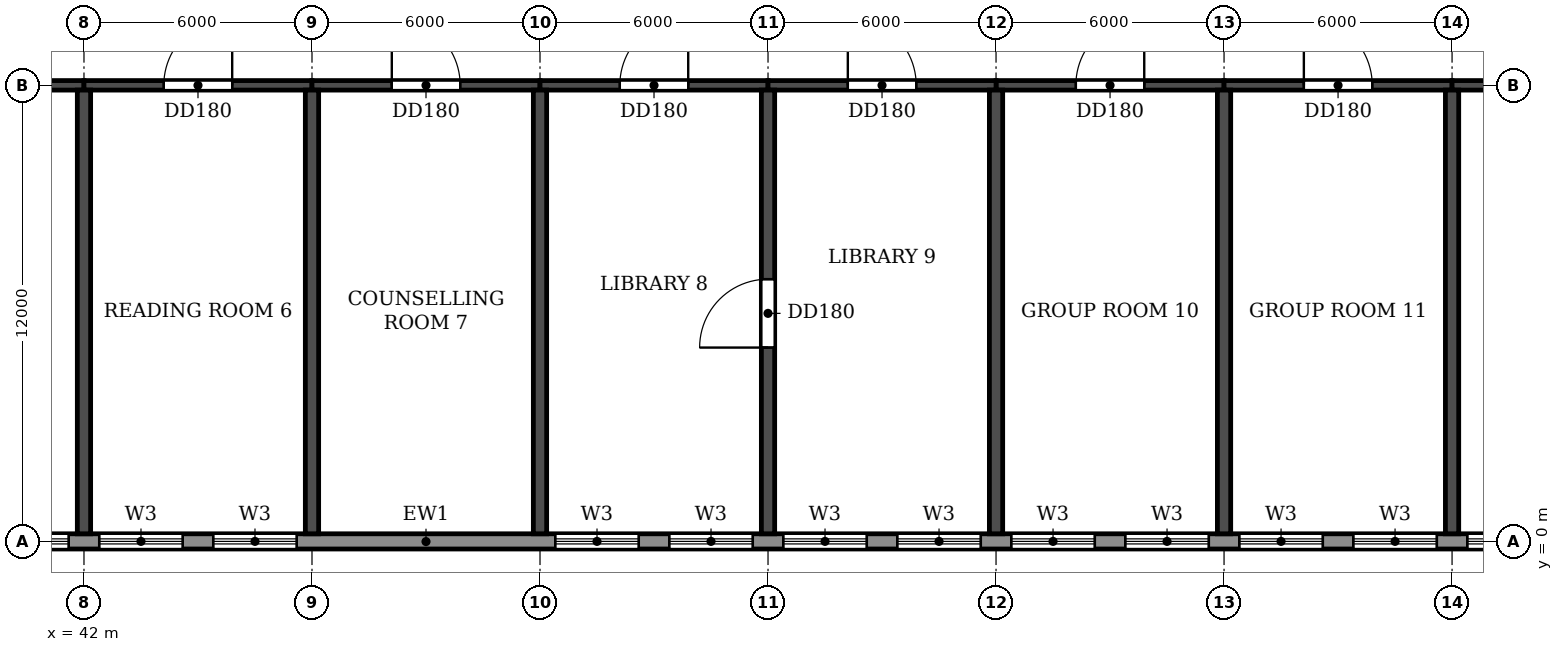
"""IFC4 building model, lengths in metres.
Left out: names, types, materials, properties, quantities, classifications, styles, units other than length and angle.
Written with IfcOpenShell. Run it as: python <this file> out.ifc"""

import sys

from ifc_helpers import new_model, si_unit, direction, frame, frame_2d, origin, place, context, subcontext, project, spatial, rectangle, extrude, element, fill, save


model = new_model("IFC4")
c1 = context("Model", 3, precision=1e-05, world=origin(), true_north=direction((0.0, 1.0)))
c2 = subcontext(c1, "Body", "Model", "MODEL_VIEW")
j1 = project(units=[si_unit("LENGTHUNIT", "METRE"), si_unit("PLANEANGLEUNIT", "RADIAN")], contexts=[c1])
p1 = place(None, origin())
s1 = spatial("IfcSite", under=j1, at=p1, CompositionType="ELEMENT")
p2 = place(p1, origin())
s2 = spatial("IfcBuilding", under=s1, at=p2, CompositionType="ELEMENT")
p3 = place(p2, frame((0.0, 0.0, 105.9)))
s3 = spatial("IfcBuildingStorey", under=s2, at=p3, CompositionType="ELEMENT", Elevation=105.9)
for number, where, z_axis, x_axis in (
    (1, (42.0, 0.2, 0.0), (0.0, 0.0, 1.0), (0.0, 1.0, 0.0)),
    (2, (48.0, 0.2, 0.0), (0.0, 0.0, 1.0), (0.0, 1.0, 0.0)),
    (3, (54.0, 0.2, 0.0), (0.0, 0.0, 1.0), (0.0, 1.0, 0.0)),
):
    element("IfcWall", number, at=place(p3, frame(where, z_axis=z_axis, x_axis=x_axis)), inside=s3, PredefinedType="SHEAR", context=c2, shape_type="SweptSolid", body=[
        extrude(rectangle(XDim=11.675, YDim=0.35, at=frame_2d((5.837, 0.0))), origin(), (0.0, 0.0, 1.0), 3.06),
    ])
p4 = place(p3, frame((60.0, 0.2, 0.0), z_axis=(0.0, 0.0, 1.0), x_axis=(0.0, 1.0, 0.0)))
e4 = element("IfcWall", 4, at=p4, inside=s3, PredefinedType="SHEAR", context=c2, shape_type="SweptSolid", body=[
    extrude(rectangle(XDim=11.675, YDim=0.35, at=frame_2d((5.837, 0.0))), origin(), (0.0, 0.0, 1.0), 3.06),
])
p5 = place(p4, frame((4.9, 0.0, 0.0)))
e5 = element("IfcOpeningElement", 5, at=p5, cuts=e4, PredefinedType="OPENING", context=c2, shape_type="SweptSolid", body=[
    extrude(rectangle(XDim=1.8, YDim=2.1, at=frame_2d((0.9, 1.05))), frame((0.0, 0.185, 0.0), z_axis=(0.0, -1.0, 0.0), x_axis=(1.0, 0.0, 0.0)), (0.0, 0.0, 1.0), 0.37),
])
for number, where, z_axis, x_axis in (
    (6, (66.0, 0.2, 0.0), (0.0, 0.0, 1.0), (0.0, 1.0, 0.0)),
    (7, (72.0, 0.2, 0.0), (0.0, 0.0, 1.0), (0.0, 1.0, 0.0)),
    (8, (78.0, 0.2, 0.0), (0.0, 0.0, 1.0), (0.0, 1.0, 0.0)),
):
    element("IfcWall", number, at=place(p3, frame(where, z_axis=z_axis, x_axis=x_axis)), inside=s3, PredefinedType="SHEAR", context=c2, shape_type="SweptSolid", body=[
        extrude(rectangle(XDim=11.675, YDim=0.35, at=frame_2d((5.837, 0.0))), origin(), (0.0, 0.0, 1.0), 3.06),
    ])
p6 = place(p3, frame((36.0, 12.0, 0.0), z_axis=(0.0, 0.0, 1.0), x_axis=(1.0, 0.0, 0.0)))
e9 = element("IfcWall", 9, at=p6, inside=s3, PredefinedType="SHEAR", context=c2, shape_type="SweptSolid", body=[
    extrude(rectangle(XDim=6.0, YDim=0.25, at=frame_2d((3.0, 0.0))), origin(), (0.0, 0.0, 1.0), 2.46),
])
p7 = place(p6, frame((2.1, 0.0, 0.0)))
e10 = element("IfcOpeningElement", 10, at=p7, cuts=e9, PredefinedType="OPENING", context=c2, shape_type="SweptSolid", body=[
    extrude(rectangle(XDim=1.8, YDim=2.1, at=frame_2d((0.9, 1.05))), frame((0.0, 0.135, 0.0), z_axis=(0.0, -1.0, 0.0), x_axis=(1.0, 0.0, 0.0)), (0.0, 0.0, 1.0), 0.27),
])
p8 = place(p3, frame((42.0, 12.0, 0.0), z_axis=(0.0, 0.0, 1.0), x_axis=(1.0, 0.0, 0.0)))
e11 = element("IfcWall", 11, at=p8, inside=s3, PredefinedType="SHEAR", context=c2, shape_type="SweptSolid", body=[
    extrude(rectangle(XDim=6.0, YDim=0.25, at=frame_2d((3.0, 0.0))), origin(), (0.0, 0.0, 1.0), 2.46),
])
p9 = place(p8, frame((2.1, 0.0, 0.0)))
e12 = element("IfcOpeningElement", 12, at=p9, cuts=e11, PredefinedType="OPENING", context=c2, shape_type="SweptSolid", body=[
    extrude(rectangle(XDim=1.8, YDim=2.1, at=frame_2d((0.9, 1.05))), frame((0.0, 0.135, 0.0), z_axis=(0.0, -1.0, 0.0), x_axis=(1.0, 0.0, 0.0)), (0.0, 0.0, 1.0), 0.27),
])
p10 = place(p3, frame((48.0, 12.0, 0.0), z_axis=(0.0, 0.0, 1.0), x_axis=(1.0, 0.0, 0.0)))
e13 = element("IfcWall", 13, at=p10, inside=s3, PredefinedType="SHEAR", context=c2, shape_type="SweptSolid", body=[
    extrude(rectangle(XDim=6.0, YDim=0.25, at=frame_2d((3.0, 0.0))), origin(), (0.0, 0.0, 1.0), 2.46),
])
p11 = place(p10, frame((2.1, 0.0, 0.0)))
e14 = element("IfcOpeningElement", 14, at=p11, cuts=e13, PredefinedType="OPENING", context=c2, shape_type="SweptSolid", body=[
    extrude(rectangle(XDim=1.8, YDim=2.1, at=frame_2d((0.9, 1.05))), frame((0.0, 0.135, 0.0), z_axis=(0.0, -1.0, 0.0), x_axis=(1.0, 0.0, 0.0)), (0.0, 0.0, 1.0), 0.27),
])
p12 = place(p3, frame((54.0, 12.0, 0.0), z_axis=(0.0, 0.0, 1.0), x_axis=(1.0, 0.0, 0.0)))
e15 = element("IfcWall", 15, at=p12, inside=s3, PredefinedType="SHEAR", context=c2, shape_type="SweptSolid", body=[
    extrude(rectangle(XDim=6.0, YDim=0.25, at=frame_2d((3.0, 0.0))), origin(), (0.0, 0.0, 1.0), 2.46),
])
p13 = place(p12, frame((2.1, 0.0, 0.0)))
e16 = element("IfcOpeningElement", 16, at=p13, cuts=e15, PredefinedType="OPENING", context=c2, shape_type="SweptSolid", body=[
    extrude(rectangle(XDim=1.8, YDim=2.1, at=frame_2d((0.9, 1.05))), frame((0.0, 0.135, 0.0), z_axis=(0.0, -1.0, 0.0), x_axis=(1.0, 0.0, 0.0)), (0.0, 0.0, 1.0), 0.27),
])
p14 = place(p3, frame((60.0, 12.0, 0.0), z_axis=(0.0, 0.0, 1.0), x_axis=(1.0, 0.0, 0.0)))
e17 = element("IfcWall", 17, at=p14, inside=s3, PredefinedType="SHEAR", context=c2, shape_type="SweptSolid", body=[
    extrude(rectangle(XDim=6.0, YDim=0.25, at=frame_2d((3.0, 0.0))), origin(), (0.0, 0.0, 1.0), 2.46),
])
p15 = place(p14, frame((2.1, 0.0, 0.0)))
e18 = element("IfcOpeningElement", 18, at=p15, cuts=e17, PredefinedType="OPENING", context=c2, shape_type="SweptSolid", body=[
    extrude(rectangle(XDim=1.8, YDim=2.1, at=frame_2d((0.9, 1.05))), frame((0.0, 0.135, 0.0), z_axis=(0.0, -1.0, 0.0), x_axis=(1.0, 0.0, 0.0)), (0.0, 0.0, 1.0), 0.27),
])
p16 = place(p3, frame((66.0, 12.0, 0.0), z_axis=(0.0, 0.0, 1.0), x_axis=(1.0, 0.0, 0.0)))
e19 = element("IfcWall", 19, at=p16, inside=s3, PredefinedType="SHEAR", context=c2, shape_type="SweptSolid", body=[
    extrude(rectangle(XDim=6.0, YDim=0.25, at=frame_2d((3.0, 0.0))), origin(), (0.0, 0.0, 1.0), 2.46),
])
p17 = place(p16, frame((2.1, 0.0, 0.0)))
e20 = element("IfcOpeningElement", 20, at=p17, cuts=e19, PredefinedType="OPENING", context=c2, shape_type="SweptSolid", body=[
    extrude(rectangle(XDim=1.8, YDim=2.1, at=frame_2d((0.9, 1.05))), frame((0.0, 0.135, 0.0), z_axis=(0.0, -1.0, 0.0), x_axis=(1.0, 0.0, 0.0)), (0.0, 0.0, 1.0), 0.27),
])
p18 = place(p3, frame((72.0, 12.0, 0.0), z_axis=(0.0, 0.0, 1.0), x_axis=(1.0, 0.0, 0.0)))
e21 = element("IfcWall", 21, at=p18, inside=s3, PredefinedType="SHEAR", context=c2, shape_type="SweptSolid", body=[
    extrude(rectangle(XDim=6.0, YDim=0.25, at=frame_2d((3.0, 0.0))), origin(), (0.0, 0.0, 1.0), 2.46),
])
p19 = place(p18, frame((2.1, 0.0, 0.0)))
e22 = element("IfcOpeningElement", 22, at=p19, cuts=e21, PredefinedType="OPENING", context=c2, shape_type="SweptSolid", body=[
    extrude(rectangle(XDim=1.8, YDim=2.1, at=frame_2d((0.9, 1.05))), frame((0.0, 0.135, 0.0), z_axis=(0.0, -1.0, 0.0), x_axis=(1.0, 0.0, 0.0)), (0.0, 0.0, 1.0), 0.27),
])
p20 = place(p3, frame((78.0, 12.0, 0.0), z_axis=(0.0, 0.0, 1.0), x_axis=(1.0, 0.0, 0.0)))
e23 = element("IfcWall", 23, at=p20, inside=s3, PredefinedType="SHEAR", context=c2, shape_type="SweptSolid", body=[
    extrude(rectangle(XDim=6.0, YDim=0.25, at=frame_2d((3.0, 0.0))), origin(), (0.0, 0.0, 1.0), 2.46),
])
p21 = place(p20, frame((2.1, 0.0, 0.0)))
e24 = element("IfcOpeningElement", 24, at=p21, cuts=e23, PredefinedType="OPENING", context=c2, shape_type="SweptSolid", body=[
    extrude(rectangle(XDim=1.8, YDim=2.1, at=frame_2d((0.9, 1.05))), frame((0.0, 0.135, 0.0), z_axis=(0.0, -1.0, 0.0), x_axis=(1.0, 0.0, 0.0)), (0.0, 0.0, 1.0), 0.27),
])
p22 = place(p3, frame((16.683, 0.0, 0.0), z_axis=(0.0, 0.0, 1.0), x_axis=(1.0, 0.0, 0.0)))
e25 = element("IfcWall", 25, at=p22, inside=s3, PredefinedType="STANDARD", context=c2, shape_type="SweptSolid", body=[
    extrude(rectangle(XDim=68.634, YDim=0.4, at=frame_2d((34.317, 0.0))), origin(), (0.0, 0.0, 1.0), 3.06),
])
p23 = place(p22, frame((1.717, 0.0, 0.6)))
e26 = element("IfcOpeningElement", 26, at=p23, cuts=e25, PredefinedType="OPENING", context=c2, shape_type="SweptSolid", body=[
    extrude(rectangle(XDim=2.2, YDim=1.8, at=frame_2d((1.1, 0.9))), frame((0.0, 0.21, 0.0), z_axis=(0.0, -1.0, 0.0), x_axis=(1.0, 0.0, 0.0)), (0.0, 0.0, 1.0), 0.42),
])
p24 = place(p22, frame((4.717, 0.0, 0.6)))
e27 = element("IfcOpeningElement", 27, at=p24, cuts=e25, PredefinedType="OPENING", context=c2, shape_type="SweptSolid", body=[
    extrude(rectangle(XDim=2.2, YDim=1.8, at=frame_2d((1.1, 0.9))), frame((0.0, 0.21, 0.0), z_axis=(0.0, -1.0, 0.0), x_axis=(1.0, 0.0, 0.0)), (0.0, 0.0, 1.0), 0.42),
])
p25 = place(p22, frame((7.717, 0.0, 0.6)))
e28 = element("IfcOpeningElement", 28, at=p25, cuts=e25, PredefinedType="OPENING", context=c2, shape_type="SweptSolid", body=[
    extrude(rectangle(XDim=2.2, YDim=1.8, at=frame_2d((1.1, 0.9))), frame((0.0, 0.21, 0.0), z_axis=(0.0, -1.0, 0.0), x_axis=(1.0, 0.0, 0.0)), (0.0, 0.0, 1.0), 0.42),
])
p26 = place(p22, frame((10.717, 0.0, 0.6)))
e29 = element("IfcOpeningElement", 29, at=p26, cuts=e25, PredefinedType="OPENING", context=c2, shape_type="SweptSolid", body=[
    extrude(rectangle(XDim=2.2, YDim=1.8, at=frame_2d((1.1, 0.9))), frame((0.0, 0.21, 0.0), z_axis=(0.0, -1.0, 0.0), x_axis=(1.0, 0.0, 0.0)), (0.0, 0.0, 1.0), 0.42),
])
p27 = place(p22, frame((19.717, 0.0, 0.6)))
e30 = element("IfcOpeningElement", 30, at=p27, cuts=e25, PredefinedType="OPENING", context=c2, shape_type="SweptSolid", body=[
    extrude(rectangle(XDim=2.2, YDim=1.8, at=frame_2d((1.1, 0.9))), frame((0.0, 0.21, 0.0), z_axis=(0.0, -1.0, 0.0), x_axis=(1.0, 0.0, 0.0)), (0.0, 0.0, 1.0), 0.42),
])
p28 = place(p22, frame((22.717, 0.0, 0.6)))
e31 = element("IfcOpeningElement", 31, at=p28, cuts=e25, PredefinedType="OPENING", context=c2, shape_type="SweptSolid", body=[
    extrude(rectangle(XDim=2.2, YDim=1.8, at=frame_2d((1.1, 0.9))), frame((0.0, 0.21, 0.0), z_axis=(0.0, -1.0, 0.0), x_axis=(1.0, 0.0, 0.0)), (0.0, 0.0, 1.0), 0.42),
])
p29 = place(p22, frame((25.717, 0.0, 0.6)))
e32 = element("IfcOpeningElement", 32, at=p29, cuts=e25, PredefinedType="OPENING", context=c2, shape_type="SweptSolid", body=[
    extrude(rectangle(XDim=2.2, YDim=1.8, at=frame_2d((1.1, 0.9))), frame((0.0, 0.21, 0.0), z_axis=(0.0, -1.0, 0.0), x_axis=(1.0, 0.0, 0.0)), (0.0, 0.0, 1.0), 0.42),
])
p30 = place(p22, frame((28.717, 0.0, 0.6)))
e33 = element("IfcOpeningElement", 33, at=p30, cuts=e25, PredefinedType="OPENING", context=c2, shape_type="SweptSolid", body=[
    extrude(rectangle(XDim=2.2, YDim=1.8, at=frame_2d((1.1, 0.9))), frame((0.0, 0.21, 0.0), z_axis=(0.0, -1.0, 0.0), x_axis=(1.0, 0.0, 0.0)), (0.0, 0.0, 1.0), 0.42),
])
p31 = place(p22, frame((37.717, 0.0, 0.6)))
e34 = element("IfcOpeningElement", 34, at=p31, cuts=e25, PredefinedType="OPENING", context=c2, shape_type="SweptSolid", body=[
    extrude(rectangle(XDim=2.2, YDim=1.8, at=frame_2d((1.1, 0.9))), frame((0.0, 0.21, 0.0), z_axis=(0.0, -1.0, 0.0), x_axis=(1.0, 0.0, 0.0)), (0.0, 0.0, 1.0), 0.42),
])
p32 = place(p22, frame((40.717, 0.0, 0.6)))
e35 = element("IfcOpeningElement", 35, at=p32, cuts=e25, PredefinedType="OPENING", context=c2, shape_type="SweptSolid", body=[
    extrude(rectangle(XDim=2.2, YDim=1.8, at=frame_2d((1.1, 0.9))), frame((0.0, 0.21, 0.0), z_axis=(0.0, -1.0, 0.0), x_axis=(1.0, 0.0, 0.0)), (0.0, 0.0, 1.0), 0.42),
])
p33 = place(p22, frame((43.717, 0.0, 0.6)))
e36 = element("IfcOpeningElement", 36, at=p33, cuts=e25, PredefinedType="OPENING", context=c2, shape_type="SweptSolid", body=[
    extrude(rectangle(XDim=2.2, YDim=1.8, at=frame_2d((1.1, 0.9))), frame((0.0, 0.21, 0.0), z_axis=(0.0, -1.0, 0.0), x_axis=(1.0, 0.0, 0.0)), (0.0, 0.0, 1.0), 0.42),
])
p34 = place(p22, frame((46.717, 0.0, 0.6)))
e37 = element("IfcOpeningElement", 37, at=p34, cuts=e25, PredefinedType="OPENING", context=c2, shape_type="SweptSolid", body=[
    extrude(rectangle(XDim=2.2, YDim=1.8, at=frame_2d((1.1, 0.9))), frame((0.0, 0.21, 0.0), z_axis=(0.0, -1.0, 0.0), x_axis=(1.0, 0.0, 0.0)), (0.0, 0.0, 1.0), 0.42),
])
p35 = place(p22, frame((49.717, 0.0, 0.6)))
e38 = element("IfcOpeningElement", 38, at=p35, cuts=e25, PredefinedType="OPENING", context=c2, shape_type="SweptSolid", body=[
    extrude(rectangle(XDim=2.2, YDim=1.8, at=frame_2d((1.1, 0.9))), frame((0.0, 0.21, 0.0), z_axis=(0.0, -1.0, 0.0), x_axis=(1.0, 0.0, 0.0)), (0.0, 0.0, 1.0), 0.42),
])
p36 = place(p22, frame((52.717, 0.0, 0.6)))
e39 = element("IfcOpeningElement", 39, at=p36, cuts=e25, PredefinedType="OPENING", context=c2, shape_type="SweptSolid", body=[
    extrude(rectangle(XDim=2.2, YDim=1.8, at=frame_2d((1.1, 0.9))), frame((0.0, 0.21, 0.0), z_axis=(0.0, -1.0, 0.0), x_axis=(1.0, 0.0, 0.0)), (0.0, 0.0, 1.0), 0.42),
])
p37 = place(p22, frame((55.717, 0.0, 0.6)))
e40 = element("IfcOpeningElement", 40, at=p37, cuts=e25, PredefinedType="OPENING", context=c2, shape_type="SweptSolid", body=[
    extrude(rectangle(XDim=2.2, YDim=1.8, at=frame_2d((1.1, 0.9))), frame((0.0, 0.21, 0.0), z_axis=(0.0, -1.0, 0.0), x_axis=(1.0, 0.0, 0.0)), (0.0, 0.0, 1.0), 0.42),
])
p38 = place(p22, frame((58.717, 0.0, 0.6)))
e41 = element("IfcOpeningElement", 41, at=p38, cuts=e25, PredefinedType="OPENING", context=c2, shape_type="SweptSolid", body=[
    extrude(rectangle(XDim=2.2, YDim=1.8, at=frame_2d((1.1, 0.9))), frame((0.0, 0.21, 0.0), z_axis=(0.0, -1.0, 0.0), x_axis=(1.0, 0.0, 0.0)), (0.0, 0.0, 1.0), 0.42),
])
p39 = place(p22, frame((61.717, 0.0, 0.6)))
e42 = element("IfcOpeningElement", 42, at=p39, cuts=e25, PredefinedType="OPENING", context=c2, shape_type="SweptSolid", body=[
    extrude(rectangle(XDim=2.2, YDim=1.8, at=frame_2d((1.1, 0.9))), frame((0.0, 0.21, 0.0), z_axis=(0.0, -1.0, 0.0), x_axis=(1.0, 0.0, 0.0)), (0.0, 0.0, 1.0), 0.42),
])
p40 = place(p22, frame((64.717, 0.0, 0.6)))
e43 = element("IfcOpeningElement", 43, at=p40, cuts=e25, PredefinedType="OPENING", context=c2, shape_type="SweptSolid", body=[
    extrude(rectangle(XDim=2.2, YDim=1.8, at=frame_2d((1.1, 0.9))), frame((0.0, 0.21, 0.0), z_axis=(0.0, -1.0, 0.0), x_axis=(1.0, 0.0, 0.0)), (0.0, 0.0, 1.0), 0.42),
])
p41 = place(p28, origin())
e44 = element("IfcWindow", 44, at=p41, inside=s3, PartitioningType="DOUBLE_PANEL_HORIZONTAL", PredefinedType="WINDOW", context=c2, shape_type="SweptSolid", body=[
    extrude(rectangle(XDim=2.2, YDim=1.8, at=frame_2d((1.1, 0.9))), frame((0.0, 0.03, 0.0), z_axis=(0.0, -1.0, 0.0), x_axis=(1.0, 0.0, 0.0)), (0.0, 0.0, 1.0), 0.06),
])
fill(e31, e44)
p42 = place(p29, origin())
e45 = element("IfcWindow", 45, at=p42, inside=s3, PartitioningType="DOUBLE_PANEL_HORIZONTAL", PredefinedType="WINDOW", context=c2, shape_type="SweptSolid", body=[
    extrude(rectangle(XDim=2.2, YDim=1.8, at=frame_2d((1.1, 0.9))), frame((0.0, 0.03, 0.0), z_axis=(0.0, -1.0, 0.0), x_axis=(1.0, 0.0, 0.0)), (0.0, 0.0, 1.0), 0.06),
])
fill(e32, e45)
p43 = place(p30, origin())
e46 = element("IfcWindow", 46, at=p43, inside=s3, PartitioningType="DOUBLE_PANEL_HORIZONTAL", PredefinedType="WINDOW", context=c2, shape_type="SweptSolid", body=[
    extrude(rectangle(XDim=2.2, YDim=1.8, at=frame_2d((1.1, 0.9))), frame((0.0, 0.03, 0.0), z_axis=(0.0, -1.0, 0.0), x_axis=(1.0, 0.0, 0.0)), (0.0, 0.0, 1.0), 0.06),
])
fill(e33, e46)
p44 = place(p31, origin())
e47 = element("IfcWindow", 47, at=p44, inside=s3, PartitioningType="DOUBLE_PANEL_HORIZONTAL", PredefinedType="WINDOW", context=c2, shape_type="SweptSolid", body=[
    extrude(rectangle(XDim=2.2, YDim=1.8, at=frame_2d((1.1, 0.9))), frame((0.0, 0.03, 0.0), z_axis=(0.0, -1.0, 0.0), x_axis=(1.0, 0.0, 0.0)), (0.0, 0.0, 1.0), 0.06),
])
fill(e34, e47)
p45 = place(p32, origin())
e48 = element("IfcWindow", 48, at=p45, inside=s3, PartitioningType="DOUBLE_PANEL_HORIZONTAL", PredefinedType="WINDOW", context=c2, shape_type="SweptSolid", body=[
    extrude(rectangle(XDim=2.2, YDim=1.8, at=frame_2d((1.1, 0.9))), frame((0.0, 0.03, 0.0), z_axis=(0.0, -1.0, 0.0), x_axis=(1.0, 0.0, 0.0)), (0.0, 0.0, 1.0), 0.06),
])
fill(e35, e48)
p46 = place(p33, origin())
e49 = element("IfcWindow", 49, at=p46, inside=s3, PartitioningType="DOUBLE_PANEL_HORIZONTAL", PredefinedType="WINDOW", context=c2, shape_type="SweptSolid", body=[
    extrude(rectangle(XDim=2.2, YDim=1.8, at=frame_2d((1.1, 0.9))), frame((0.0, 0.03, 0.0), z_axis=(0.0, -1.0, 0.0), x_axis=(1.0, 0.0, 0.0)), (0.0, 0.0, 1.0), 0.06),
])
fill(e36, e49)
p47 = place(p34, origin())
e50 = element("IfcWindow", 50, at=p47, inside=s3, PartitioningType="DOUBLE_PANEL_HORIZONTAL", PredefinedType="WINDOW", context=c2, shape_type="SweptSolid", body=[
    extrude(rectangle(XDim=2.2, YDim=1.8, at=frame_2d((1.1, 0.9))), frame((0.0, 0.03, 0.0), z_axis=(0.0, -1.0, 0.0), x_axis=(1.0, 0.0, 0.0)), (0.0, 0.0, 1.0), 0.06),
])
fill(e37, e50)
p48 = place(p35, origin())
e51 = element("IfcWindow", 51, at=p48, inside=s3, PartitioningType="DOUBLE_PANEL_HORIZONTAL", PredefinedType="WINDOW", context=c2, shape_type="SweptSolid", body=[
    extrude(rectangle(XDim=2.2, YDim=1.8, at=frame_2d((1.1, 0.9))), frame((0.0, 0.03, 0.0), z_axis=(0.0, -1.0, 0.0), x_axis=(1.0, 0.0, 0.0)), (0.0, 0.0, 1.0), 0.06),
])
fill(e38, e51)
p49 = place(p36, origin())
e52 = element("IfcWindow", 52, at=p49, inside=s3, PartitioningType="DOUBLE_PANEL_HORIZONTAL", PredefinedType="WINDOW", context=c2, shape_type="SweptSolid", body=[
    extrude(rectangle(XDim=2.2, YDim=1.8, at=frame_2d((1.1, 0.9))), frame((0.0, 0.03, 0.0), z_axis=(0.0, -1.0, 0.0), x_axis=(1.0, 0.0, 0.0)), (0.0, 0.0, 1.0), 0.06),
])
fill(e39, e52)
p50 = place(p37, origin())
e53 = element("IfcWindow", 53, at=p50, inside=s3, PartitioningType="DOUBLE_PANEL_HORIZONTAL", PredefinedType="WINDOW", context=c2, shape_type="SweptSolid", body=[
    extrude(rectangle(XDim=2.2, YDim=1.8, at=frame_2d((1.1, 0.9))), frame((0.0, 0.03, 0.0), z_axis=(0.0, -1.0, 0.0), x_axis=(1.0, 0.0, 0.0)), (0.0, 0.0, 1.0), 0.06),
])
fill(e40, e53)
p51 = place(p38, origin())
e54 = element("IfcWindow", 54, at=p51, inside=s3, PartitioningType="DOUBLE_PANEL_HORIZONTAL", PredefinedType="WINDOW", context=c2, shape_type="SweptSolid", body=[
    extrude(rectangle(XDim=2.2, YDim=1.8, at=frame_2d((1.1, 0.9))), frame((0.0, 0.03, 0.0), z_axis=(0.0, -1.0, 0.0), x_axis=(1.0, 0.0, 0.0)), (0.0, 0.0, 1.0), 0.06),
])
fill(e41, e54)
p52 = place(p39, origin())
e55 = element("IfcWindow", 55, at=p52, inside=s3, PartitioningType="DOUBLE_PANEL_HORIZONTAL", PredefinedType="WINDOW", context=c2, shape_type="SweptSolid", body=[
    extrude(rectangle(XDim=2.2, YDim=1.8, at=frame_2d((1.1, 0.9))), frame((0.0, 0.03, 0.0), z_axis=(0.0, -1.0, 0.0), x_axis=(1.0, 0.0, 0.0)), (0.0, 0.0, 1.0), 0.06),
])
fill(e42, e55)
p53 = place(p9, origin())
e56 = element("IfcDoor", 56, at=p53, inside=s3, OperationType="DOUBLE_DOOR_SINGLE_SWING", PredefinedType="DOOR", context=c2, shape_type="SweptSolid", body=[
    extrude(rectangle(XDim=1.8, YDim=2.1, at=frame_2d((0.9, 1.05))), frame((0.0, 0.025, 0.0), z_axis=(0.0, -1.0, 0.0), x_axis=(1.0, 0.0, 0.0)), (0.0, 0.0, 1.0), 0.05),
])
fill(e12, e56)
p54 = place(p11, origin())
e57 = element("IfcDoor", 57, at=p54, inside=s3, OperationType="DOUBLE_DOOR_SINGLE_SWING", PredefinedType="DOOR", context=c2, shape_type="SweptSolid", body=[
    extrude(rectangle(XDim=1.8, YDim=2.1, at=frame_2d((0.9, 1.05))), frame((0.0, 0.025, 0.0), z_axis=(0.0, -1.0, 0.0), x_axis=(1.0, 0.0, 0.0)), (0.0, 0.0, 1.0), 0.05),
])
fill(e14, e57)
p55 = place(p13, origin())
e58 = element("IfcDoor", 58, at=p55, inside=s3, OperationType="DOUBLE_DOOR_SINGLE_SWING", PredefinedType="DOOR", context=c2, shape_type="SweptSolid", body=[
    extrude(rectangle(XDim=1.8, YDim=2.1, at=frame_2d((0.9, 1.05))), frame((0.0, 0.025, 0.0), z_axis=(0.0, -1.0, 0.0), x_axis=(1.0, 0.0, 0.0)), (0.0, 0.0, 1.0), 0.05),
])
fill(e16, e58)
p56 = place(p15, origin())
e59 = element("IfcDoor", 59, at=p56, inside=s3, OperationType="DOUBLE_DOOR_SINGLE_SWING", PredefinedType="DOOR", context=c2, shape_type="SweptSolid", body=[
    extrude(rectangle(XDim=1.8, YDim=2.1, at=frame_2d((0.9, 1.05))), frame((0.0, 0.025, 0.0), z_axis=(0.0, -1.0, 0.0), x_axis=(1.0, 0.0, 0.0)), (0.0, 0.0, 1.0), 0.05),
])
fill(e18, e59)
p57 = place(p17, origin())
e60 = element("IfcDoor", 60, at=p57, inside=s3, OperationType="DOUBLE_DOOR_SINGLE_SWING", PredefinedType="DOOR", context=c2, shape_type="SweptSolid", body=[
    extrude(rectangle(XDim=1.8, YDim=2.1, at=frame_2d((0.9, 1.05))), frame((0.0, 0.025, 0.0), z_axis=(0.0, -1.0, 0.0), x_axis=(1.0, 0.0, 0.0)), (0.0, 0.0, 1.0), 0.05),
])
fill(e20, e60)
p58 = place(p19, origin())
e61 = element("IfcDoor", 61, at=p58, inside=s3, OperationType="DOUBLE_DOOR_SINGLE_SWING", PredefinedType="DOOR", context=c2, shape_type="SweptSolid", body=[
    extrude(rectangle(XDim=1.8, YDim=2.1, at=frame_2d((0.9, 1.05))), frame((0.0, 0.025, 0.0), z_axis=(0.0, -1.0, 0.0), x_axis=(1.0, 0.0, 0.0)), (0.0, 0.0, 1.0), 0.05),
])
fill(e22, e61)
p59 = place(p5, origin())
e62 = element("IfcDoor", 62, at=p59, inside=s3, OperationType="DOUBLE_DOOR_SINGLE_SWING", PredefinedType="DOOR", context=c2, shape_type="SweptSolid", body=[
    extrude(rectangle(XDim=1.8, YDim=2.1, at=frame_2d((0.9, 1.05))), frame((0.0, 0.025, 0.0), z_axis=(0.0, -1.0, 0.0), x_axis=(1.0, 0.0, 0.0)), (0.0, 0.0, 1.0), 0.05),
])
fill(e5, e62)
save(model, sys.argv[1])
